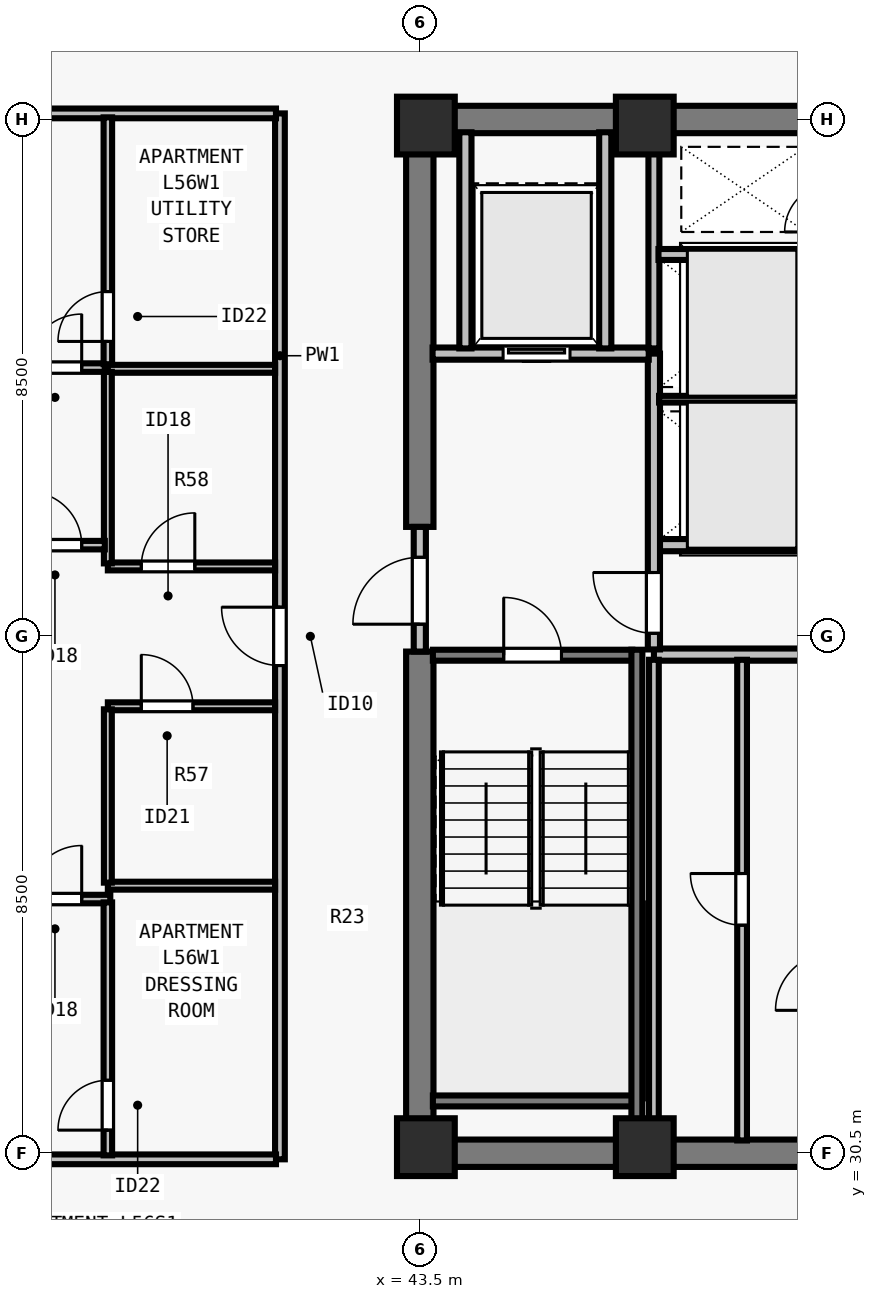
"""IFC4 building model, lengths in metres.
Left out: names, types, materials, properties, quantities, classifications, styles, units other than length and angle.
Written with IfcOpenShell. Run it as: python <this file> out.ifc"""

import sys

from ifc_helpers import new_model, si_unit, direction, frame, frame_2d, origin, origin_2d, place, context, subcontext, project, spatial, rectangle, extrude, element, fill, save


model = new_model("IFC4")
c1 = context("Model", 3, precision=1e-05, world=origin(), true_north=direction((0.0, 1.0)))
c2 = subcontext(c1, "Body", "Model", "MODEL_VIEW")
j1 = project(units=[si_unit("LENGTHUNIT", "METRE"), si_unit("PLANEANGLEUNIT", "RADIAN")], contexts=[c1])
p1 = place(None, origin())
s1 = spatial("IfcSite", under=j1, at=p1, CompositionType="ELEMENT")
p2 = place(p1, origin())
s2 = spatial("IfcBuilding", under=s1, at=p2, CompositionType="ELEMENT")
p3 = place(p2, frame((0.0, 0.0, 206.0)))
s3 = spatial("IfcBuildingStorey", under=s2, at=p3, CompositionType="ELEMENT", Elevation=206.0)
for number, where, z_axis, x_axis in (
    (1, (43.6, 30.6, 0.0), (0.0, 0.0, 1.0), (1.0, 0.0, 0.0)),
    (2, (47.2, 30.6, 0.0), (0.0, 0.0, 1.0), (1.0, 0.0, 0.0)),
    (3, (43.6, 47.4, 0.0), (0.0, 0.0, 1.0), (1.0, 0.0, 0.0)),
    (4, (47.2, 47.4, 0.0), (0.0, 0.0, 1.0), (1.0, 0.0, 0.0)),
):
    element("IfcColumn", number, at=place(p3, frame(where, z_axis=z_axis, x_axis=x_axis)), inside=s3, PredefinedType="COLUMN", context=c2, shape_type="SweptSolid", body=[
        extrude(rectangle(XDim=0.95, YDim=0.95, at=origin_2d()), origin(), (0.0, 0.0, 1.0), 3.5),
    ])
for number, where, z_axis, x_axis in (
    (5, (43.275, 30.5, 0.0), (0.0, 0.0, 1.0), (1.0, 0.0, 0.0)),
    (6, (43.275, 47.5, 0.0), (0.0, 0.0, 1.0), (1.0, 0.0, 0.0)),
):
    element("IfcWall", number, at=place(p3, frame(where, z_axis=z_axis, x_axis=x_axis)), inside=s3, PredefinedType="SHEAR", context=c2, shape_type="SweptSolid", body=[
        extrude(rectangle(XDim=17.45, YDim=0.45, at=frame_2d((8.725, 0.0))), origin(), (0.0, 0.0, 1.0), 3.29),
    ])
p4 = place(p3, frame((43.5, 30.715, 0.0), z_axis=(0.0, 0.0, 1.0), x_axis=(0.0, 1.0, 0.0)))
e7 = element("IfcWall", 7, at=p4, inside=s3, PredefinedType="SHEAR", context=c2, shape_type="SweptSolid", body=[
    extrude(rectangle(XDim=8.035, YDim=0.45, at=frame_2d((4.018, 0.0))), origin(), (0.0, 0.0, 1.0), 3.29),
])
p5 = place(p3, frame((43.5, 40.8, 0.0), z_axis=(0.0, 0.0, 1.0), x_axis=(0.0, 1.0, 0.0)))
e8 = element("IfcWall", 8, at=p5, inside=s3, PredefinedType="SHEAR", context=c2, shape_type="SweptSolid", body=[
    extrude(rectangle(XDim=6.485, YDim=0.45, at=frame_2d((3.242, 0.0))), origin(), (0.0, 0.0, 1.0), 3.29),
])
for number, where, z_axis, x_axis in (
    (9, (47.35, 38.7, 0.0), (0.0, 0.0, 1.0), (1.0, 0.0, 0.0)),
    (10, (47.35, 40.5, 0.0), (0.0, 0.0, 1.0), (1.0, 0.0, 0.0)),
):
    element("IfcWall", number, at=place(p3, frame(where, z_axis=z_axis, x_axis=x_axis)), inside=s3, PredefinedType="SOLIDWALL", context=c2, shape_type="SweptSolid", body=[
        extrude(rectangle(XDim=2.95, YDim=0.2, at=frame_2d((1.475, 0.0))), origin(), (0.0, 0.0, 1.0), 3.29),
    ])
p6 = place(p3, frame((43.5, 38.75, 0.0), z_axis=(0.0, 0.0, 1.0), x_axis=(0.0, 1.0, 0.0)))
e11 = element("IfcWall", 11, at=p6, inside=s3, PredefinedType="SOLIDWALL", context=c2, shape_type="SweptSolid", body=[
    extrude(rectangle(XDim=2.05, YDim=0.2, at=frame_2d((1.025, 0.0))), origin(), (0.0, 0.0, 1.0), 3.29),
])
p7 = place(p6, frame((0.45, 0.0, 0.0)))
e12 = element("IfcOpeningElement", 12, at=p7, cuts=e11, PredefinedType="OPENING", context=c2, shape_type="SweptSolid", body=[
    extrude(rectangle(XDim=1.1, YDim=2.15, at=frame_2d((0.55, 1.075))), frame((0.0, 0.11, 0.0), z_axis=(0.0, -1.0, 0.0), x_axis=(1.0, 0.0, 0.0)), (0.0, 0.0, 1.0), 0.22),
])
p8 = place(p3, frame((47.35, 38.785, 0.0), z_axis=(0.0, 0.0, 1.0), x_axis=(0.0, 1.0, 0.0)))
e13 = element("IfcWall", 13, at=p8, inside=s3, PredefinedType="SOLIDWALL", context=c2, shape_type="SweptSolid", body=[
    extrude(rectangle(XDim=4.865, YDim=0.2, at=frame_2d((2.433, 0.0))), origin(), (0.0, 0.0, 1.0), 3.29),
])
p9 = place(p8, frame((0.265, 0.0, 0.0)))
e14 = element("IfcOpeningElement", 14, at=p9, cuts=e13, PredefinedType="OPENING", context=c2, shape_type="SweptSolid", body=[
    extrude(rectangle(XDim=1.0, YDim=2.15, at=frame_2d((0.5, 1.075))), frame((0.0, 0.11, 0.0), z_axis=(0.0, -1.0, 0.0), x_axis=(1.0, 0.0, 0.0)), (0.0, 0.0, 1.0), 0.22),
])
p10 = place(p3, frame((43.71, 43.65, 0.0), z_axis=(0.0, 0.0, 1.0), x_axis=(1.0, 0.0, 0.0)))
e15 = element("IfcWall", 15, at=p10, inside=s3, PredefinedType="SOLIDWALL", context=c2, shape_type="SweptSolid", body=[
    extrude(rectangle(XDim=3.555, YDim=0.2, at=frame_2d((1.777, 0.0))), origin(), (0.0, 0.0, 1.0), 3.29),
])
p11 = place(p10, frame((1.16, 0.0, 0.0)))
e16 = element("IfcOpeningElement", 16, at=p11, cuts=e15, PredefinedType="OPENING", context=c2, shape_type="SweptSolid", body=[
    extrude(rectangle(XDim=1.1, YDim=2.2, at=frame_2d((0.55, 1.1))), frame((0.0, 0.11, 0.0), z_axis=(0.0, -1.0, 0.0), x_axis=(1.0, 0.0, 0.0)), (0.0, 0.0, 1.0), 0.22),
])
for number, where, z_axis, x_axis in (
    (17, (46.55, 43.735, 0.0), (0.0, 0.0, 1.0), (0.0, 1.0, 0.0)),
    (18, (44.25, 43.735, 0.0), (0.0, 0.0, 1.0), (0.0, 1.0, 0.0)),
):
    element("IfcWall", number, at=place(p3, frame(where, z_axis=z_axis, x_axis=x_axis)), inside=s3, PredefinedType="SOLIDWALL", context=c2, shape_type="SweptSolid", body=[
        extrude(rectangle(XDim=3.555, YDim=0.2, at=frame_2d((1.777, 0.0))), origin(), (0.0, 0.0, 1.0), 3.29),
    ])
p12 = place(p3, frame((47.35, 30.71, 0.0), z_axis=(0.0, 0.0, 1.0), x_axis=(0.0, 1.0, 0.0)))
e19 = element("IfcWall", 19, at=p12, inside=s3, PredefinedType="PARTITIONING", context=c2, shape_type="SweptSolid", body=[
    extrude(rectangle(XDim=7.905, YDim=0.16, at=frame_2d((3.953, 0.0))), origin(), (0.0, 0.0, 1.0), 3.29),
])
p13 = place(p3, frame((48.8, 30.71, 0.0), z_axis=(0.0, 0.0, 1.0), x_axis=(0.0, 1.0, 0.0)))
e20 = element("IfcWall", 20, at=p13, inside=s3, PredefinedType="PARTITIONING", context=c2, shape_type="SweptSolid", body=[
    extrude(rectangle(XDim=7.905, YDim=0.16, at=frame_2d((3.953, 0.0))), origin(), (0.0, 0.0, 1.0), 3.29),
])
p14 = place(p13, frame((3.54, 0.0, 0.0)))
e21 = element("IfcOpeningElement", 21, at=p14, cuts=e20, PredefinedType="OPENING", context=c2, shape_type="SweptSolid", body=[
    extrude(rectangle(XDim=0.85, YDim=2.12, at=frame_2d((0.425, 1.06))), frame((0.0, 0.09, 0.0), z_axis=(0.0, -1.0, 0.0), x_axis=(1.0, 0.0, 0.0)), (0.0, 0.0, 1.0), 0.18),
])
p15 = place(p3, frame((47.35, 43.735, 0.0), z_axis=(0.0, 0.0, 1.0), x_axis=(0.0, 1.0, 0.0)))
e22 = element("IfcWall", 22, at=p15, inside=s3, PredefinedType="SOLIDWALL", context=c2, shape_type="SweptSolid", body=[
    extrude(rectangle(XDim=3.555, YDim=0.18, at=frame_2d((1.777, 0.0))), origin(), (0.0, 0.0, 1.0), 3.29),
])
p16 = place(p3, frame((47.435, 42.9, 0.0), z_axis=(0.0, 0.0, 1.0), x_axis=(1.0, 0.0, 0.0)))
e23 = element("IfcWall", 23, at=p16, inside=s3, PredefinedType="PARTITIONING", context=c2, shape_type="SweptSolid", body=[
    extrude(rectangle(XDim=2.78, YDim=0.11, at=frame_2d((1.39, 0.0))), origin(), (0.0, 0.0, 1.0), 3.29),
])
p17 = place(p3, frame((47.425, 45.28, 0.0), z_axis=(0.0, 0.0, 1.0), x_axis=(1.0, 0.0, 0.0)))
e24 = element("IfcWall", 24, at=p17, inside=s3, PredefinedType="SOLIDWALL", context=c2, shape_type="SweptSolid", body=[
    extrude(rectangle(XDim=2.79, YDim=0.18, at=frame_2d((1.395, 0.0))), origin(), (0.0, 0.0, 1.0), 3.29),
])
p18 = place(p3, frame((41.2, 30.4, 0.0), z_axis=(0.0, 0.0, 1.0), x_axis=(0.0, 1.0, 0.0)))
e25 = element("IfcWall", 25, at=p18, inside=s3, PredefinedType="PARTITIONING", context=c2, shape_type="SweptSolid", body=[
    extrude(rectangle(XDim=17.2, YDim=0.16, at=frame_2d((8.6, 0.0))), origin(), (0.0, 0.0, 1.0), 3.29),
])
p19 = place(p18, frame((8.12, 0.0, 0.0)))
e26 = element("IfcOpeningElement", 26, at=p19, cuts=e25, PredefinedType="OPENING", context=c2, shape_type="SweptSolid", body=[
    extrude(rectangle(XDim=0.96, YDim=2.18, at=frame_2d((0.48, 1.09))), frame((0.0, 0.09, 0.0), z_axis=(0.0, -1.0, 0.0), x_axis=(1.0, 0.0, 0.0)), (0.0, 0.0, 1.0), 0.18),
])
for number, where, z_axis, x_axis in (
    (27, (29.805, 30.4, 0.0), (0.0, 0.0, 1.0), (1.0, 0.0, 0.0)),
    (28, (29.805, 47.6, 0.0), (0.0, 0.0, 1.0), (1.0, 0.0, 0.0)),
):
    element("IfcWall", number, at=place(p3, frame(where, z_axis=z_axis, x_axis=x_axis)), inside=s3, PredefinedType="PARTITIONING", context=c2, shape_type="SweptSolid", body=[
        extrude(rectangle(XDim=11.33, YDim=0.16, at=frame_2d((5.665, 0.0))), origin(), (0.0, 0.0, 1.0), 3.29),
    ])
p20 = place(p3, frame((38.37, 34.9, 0.0), z_axis=(0.0, 0.0, 1.0), x_axis=(1.0, 0.0, 0.0)))
e29 = element("IfcWall", 29, at=p20, inside=s3, PredefinedType="PLUMBINGWALL", context=c2, shape_type="SweptSolid", body=[
    extrude(rectangle(XDim=2.75, YDim=0.13, at=frame_2d((1.375, 0.0))), origin(), (0.0, 0.0, 1.0), 3.29),
])
p21 = place(p3, frame((38.37, 37.85, 0.0), z_axis=(0.0, 0.0, 1.0), x_axis=(1.0, 0.0, 0.0)))
e30 = element("IfcWall", 30, at=p21, inside=s3, PredefinedType="PLUMBINGWALL", context=c2, shape_type="SweptSolid", body=[
    extrude(rectangle(XDim=2.75, YDim=0.13, at=frame_2d((1.375, 0.0))), origin(), (0.0, 0.0, 1.0), 3.29),
])
p22 = place(p21, frame((0.55, 0.0, 0.0)))
e31 = element("IfcOpeningElement", 31, at=p22, cuts=e30, PredefinedType="OPENING", context=c2, shape_type="SweptSolid", body=[
    extrude(rectangle(XDim=0.85, YDim=2.08, at=frame_2d((0.425, 1.04))), frame((0.0, 0.075, 0.0), z_axis=(0.0, -1.0, 0.0), x_axis=(1.0, 0.0, 0.0)), (0.0, 0.0, 1.0), 0.15),
])
p23 = place(p3, frame((38.37, 34.95, 0.0), z_axis=(0.0, 0.0, 1.0), x_axis=(0.0, 1.0, 0.0)))
e32 = element("IfcWall", 32, at=p23, inside=s3, PredefinedType="PLUMBINGWALL", context=c2, shape_type="SweptSolid", body=[
    extrude(rectangle(XDim=2.85, YDim=0.13, at=frame_2d((1.425, 0.0))), origin(), (0.0, 0.0, 1.0), 3.29),
])
p24 = place(p3, frame((38.37, 43.4, 0.0), z_axis=(0.0, 0.0, 1.0), x_axis=(1.0, 0.0, 0.0)))
e33 = element("IfcWall", 33, at=p24, inside=s3, PredefinedType="PLUMBINGWALL", context=c2, shape_type="SweptSolid", body=[
    extrude(rectangle(XDim=2.75, YDim=0.13, at=frame_2d((1.375, 0.0))), origin(), (0.0, 0.0, 1.0), 2.958),
])
p25 = place(p3, frame((38.37, 40.15, 0.0), z_axis=(0.0, 0.0, 1.0), x_axis=(1.0, 0.0, 0.0)))
e34 = element("IfcWall", 34, at=p25, inside=s3, PredefinedType="PLUMBINGWALL", context=c2, shape_type="SweptSolid", body=[
    extrude(rectangle(XDim=2.75, YDim=0.13, at=frame_2d((1.375, 0.0))), origin(), (0.0, 0.0, 1.0), 3.29),
])
p26 = place(p25, frame((0.55, 0.0, 0.0)))
e35 = element("IfcOpeningElement", 35, at=p26, cuts=e34, PredefinedType="OPENING", context=c2, shape_type="SweptSolid", body=[
    extrude(rectangle(XDim=0.88, YDim=2.1, at=frame_2d((0.44, 1.05))), frame((0.0, 0.075, 0.0), z_axis=(0.0, -1.0, 0.0), x_axis=(1.0, 0.0, 0.0)), (0.0, 0.0, 1.0), 0.15),
])
p27 = place(p3, frame((38.37, 40.2, 0.0), z_axis=(0.0, 0.0, 1.0), x_axis=(0.0, 1.0, 0.0)))
e36 = element("IfcWall", 36, at=p27, inside=s3, PredefinedType="PLUMBINGWALL", context=c2, shape_type="SweptSolid", body=[
    extrude(rectangle(XDim=3.15, YDim=0.13, at=frame_2d((1.575, 0.0))), origin(), (0.0, 0.0, 1.0), 3.29),
])
p28 = place(p3, frame((29.88, 34.68, 0.0), z_axis=(0.0, 0.0, 1.0), x_axis=(1.0, 0.0, 0.0)))
e37 = element("IfcWall", 37, at=p28, inside=s3, PredefinedType="PARTITIONING", context=c2, shape_type="SweptSolid", body=[
    extrude(rectangle(XDim=8.53, YDim=0.14, at=frame_2d((4.265, 0.0))), origin(), (0.0, 0.0, 1.0), 2.958),
])
p29 = place(p28, frame((7.18, 0.0, 0.0)))
e38 = element("IfcOpeningElement", 38, at=p29, cuts=e37, PredefinedType="OPENING", context=c2, shape_type="SweptSolid", body=[
    extrude(rectangle(XDim=0.88, YDim=2.1, at=frame_2d((0.44, 1.05))), frame((0.0, 0.08, 0.0), z_axis=(0.0, -1.0, 0.0), x_axis=(1.0, 0.0, 0.0)), (0.0, 0.0, 1.0), 0.16),
])
p30 = place(p3, frame((38.37, 30.465, 0.0), z_axis=(0.0, 0.0, 1.0), x_axis=(0.0, 1.0, 0.0)))
e39 = element("IfcWall", 39, at=p30, inside=s3, PredefinedType="PARTITIONING", context=c2, shape_type="SweptSolid", body=[
    extrude(rectangle(XDim=4.16, YDim=0.14, at=frame_2d((2.08, 0.0))), origin(), (0.0, 0.0, 1.0), 3.29),
])
p31 = place(p30, frame((0.415, 0.0, 0.0)))
e40 = element("IfcOpeningElement", 40, at=p31, cuts=e39, PredefinedType="OPENING", context=c2, shape_type="SweptSolid", body=[
    extrude(rectangle(XDim=0.82, YDim=2.1, at=frame_2d((0.41, 1.05))), frame((0.0, 0.08, 0.0), z_axis=(0.0, -1.0, 0.0), x_axis=(1.0, 0.0, 0.0)), (0.0, 0.0, 1.0), 0.16),
])
p32 = place(p3, frame((29.88, 43.42, 0.0), z_axis=(0.0, 0.0, 1.0), x_axis=(1.0, 0.0, 0.0)))
e41 = element("IfcWall", 41, at=p32, inside=s3, PredefinedType="PARTITIONING", context=c2, shape_type="SweptSolid", body=[
    extrude(rectangle(XDim=8.44, YDim=0.14, at=frame_2d((4.22, 0.0))), origin(), (0.0, 0.0, 1.0), 3.29),
])
p33 = place(p32, frame((7.18, 0.0, 0.0)))
e42 = element("IfcOpeningElement", 42, at=p33, cuts=e41, PredefinedType="OPENING", context=c2, shape_type="SweptSolid", body=[
    extrude(rectangle(XDim=0.88, YDim=2.1, at=frame_2d((0.44, 1.05))), frame((0.0, 0.08, 0.0), z_axis=(0.0, -1.0, 0.0), x_axis=(1.0, 0.0, 0.0)), (0.0, 0.0, 1.0), 0.16),
])
p34 = place(p3, frame((38.37, 43.475, 0.0), z_axis=(0.0, 0.0, 1.0), x_axis=(0.0, 1.0, 0.0)))
e43 = element("IfcWall", 43, at=p34, inside=s3, PredefinedType="PARTITIONING", context=c2, shape_type="SweptSolid", body=[
    extrude(rectangle(XDim=4.06, YDim=0.14, at=frame_2d((2.03, 0.0))), origin(), (0.0, 0.0, 1.0), 3.29),
])
p35 = place(p34, frame((0.375, 0.0, 0.0)))
e44 = element("IfcOpeningElement", 44, at=p35, cuts=e43, PredefinedType="OPENING", context=c2, shape_type="SweptSolid", body=[
    extrude(rectangle(XDim=0.82, YDim=2.1, at=frame_2d((0.41, 1.05))), frame((0.0, 0.08, 0.0), z_axis=(0.0, -1.0, 0.0), x_axis=(1.0, 0.0, 0.0)), (0.0, 0.0, 1.0), 0.16),
])
p36 = place(p3, frame((29.88, 40.5, 0.0), z_axis=(0.0, 0.0, 1.0), x_axis=(1.0, 0.0, 0.0)))
e45 = element("IfcWall", 45, at=p36, inside=s3, PredefinedType="PARTITIONING", context=c2, shape_type="SweptSolid", body=[
    extrude(rectangle(XDim=8.44, YDim=0.14, at=frame_2d((4.22, 0.0))), origin(), (0.0, 0.0, 1.0), 2.958),
])
p37 = place(p36, frame((7.18, 0.0, 0.0)))
e46 = element("IfcOpeningElement", 46, at=p37, cuts=e45, PredefinedType="OPENING", context=c2, shape_type="SweptSolid", body=[
    extrude(rectangle(XDim=0.88, YDim=2.1, at=frame_2d((0.44, 1.05))), frame((0.0, 0.08, 0.0), z_axis=(0.0, -1.0, 0.0), x_axis=(1.0, 0.0, 0.0)), (0.0, 0.0, 1.0), 0.16),
])
p38 = place(p3, frame((43.715, 38.69, 0.0), z_axis=(0.0, 0.0, 1.0), x_axis=(1.0, 0.0, 0.0)))
e47 = element("IfcWall", 47, at=p38, inside=s3, PredefinedType="SOLIDWALL", context=c2, shape_type="SweptSolid", body=[
    extrude(rectangle(XDim=3.28, YDim=0.18, at=frame_2d((1.64, 0.0))), origin(), (0.0, 0.0, 1.0), 3.29),
])
p39 = place(p38, frame((1.165, 0.0, 0.0)))
e48 = element("IfcOpeningElement", 48, at=p39, cuts=e47, PredefinedType="OPENING", context=c2, shape_type="SweptSolid", body=[
    extrude(rectangle(XDim=0.95, YDim=2.15, at=frame_2d((0.475, 1.075))), frame((0.0, 0.1, 0.0), z_axis=(0.0, -1.0, 0.0), x_axis=(1.0, 0.0, 0.0)), (0.0, 0.0, 1.0), 0.2),
])
p40 = place(p3, frame((43.715, 31.36, 0.0), z_axis=(0.0, 0.0, 1.0), x_axis=(1.0, 0.0, 0.0)))
e49 = element("IfcWall", 49, at=p40, inside=s3, PredefinedType="SOLIDWALL", context=c2, shape_type="SweptSolid", body=[
    extrude(rectangle(XDim=3.28, YDim=0.18, at=frame_2d((1.64, 0.0))), origin(), (0.0, 0.0, 1.0), 3.29),
])
p41 = place(p3, frame((47.07, 38.78, 0.0), z_axis=(0.0, 0.0, 1.0), x_axis=(0.0, -1.0, 0.0)))
e50 = element("IfcWall", 50, at=p41, inside=s3, PredefinedType="SOLIDWALL", context=c2, shape_type="SweptSolid", body=[
    extrude(rectangle(XDim=8.067, YDim=0.18, at=frame_2d((4.034, 0.0))), origin(), (0.0, 0.0, 1.0), 3.29),
])
p42 = place(p7, origin())
e51 = element("IfcDoor", 51, at=p42, inside=s3, OperationType="SINGLE_SWING_LEFT", PredefinedType="DOOR", context=c2, shape_type="SweptSolid", body=[
    extrude(rectangle(XDim=1.1, YDim=2.15, at=frame_2d((0.55, 1.075))), frame((0.0, 0.025, 0.0), z_axis=(0.0, -1.0, 0.0), x_axis=(1.0, 0.0, 0.0)), (0.0, 0.0, 1.0), 0.05),
])
fill(e12, e51)
p43 = place(p9, origin())
e52 = element("IfcDoor", 52, at=p43, inside=s3, OperationType="SINGLE_SWING_RIGHT", PredefinedType="DOOR", context=c2, shape_type="SweptSolid", body=[
    extrude(rectangle(XDim=1.0, YDim=2.15, at=frame_2d((0.5, 1.075))), frame((0.0, 0.025, 0.0), z_axis=(0.0, -1.0, 0.0), x_axis=(1.0, 0.0, 0.0)), (0.0, 0.0, 1.0), 0.05),
])
fill(e14, e52)
p44 = place(p11, origin())
e53 = element("IfcDoor", 53, at=p44, inside=s3, OperationType="SLIDING_TO_LEFT", PredefinedType="DOOR", context=c2, shape_type="SweptSolid", body=[
    extrude(rectangle(XDim=1.1, YDim=2.2, at=frame_2d((0.55, 1.1))), frame((0.0, 0.025, 0.0), z_axis=(0.0, -1.0, 0.0), x_axis=(1.0, 0.0, 0.0)), (0.0, 0.0, 1.0), 0.05),
])
fill(e16, e53)
p45 = place(p14, origin())
e54 = element("IfcDoor", 54, at=p45, inside=s3, OperationType="SINGLE_SWING_RIGHT", PredefinedType="DOOR", context=c2, shape_type="SweptSolid", body=[
    extrude(rectangle(XDim=0.85, YDim=2.12, at=frame_2d((0.425, 1.06))), frame((0.0, 0.025, 0.0), z_axis=(0.0, -1.0, 0.0), x_axis=(1.0, 0.0, 0.0)), (0.0, 0.0, 1.0), 0.05),
])
fill(e21, e54)
p46 = place(p22, origin())
e55 = element("IfcDoor", 55, at=p46, inside=s3, OperationType="SINGLE_SWING_LEFT", PredefinedType="DOOR", context=c2, shape_type="SweptSolid", body=[
    extrude(rectangle(XDim=0.85, YDim=2.08, at=frame_2d((0.425, 1.04))), frame((0.0, 0.025, 0.0), z_axis=(0.0, -1.0, 0.0), x_axis=(1.0, 0.0, 0.0)), (0.0, 0.0, 1.0), 0.05),
])
fill(e31, e55)
p47 = place(p26, origin())
e56 = element("IfcDoor", 56, at=p47, inside=s3, OperationType="SINGLE_SWING_RIGHT", PredefinedType="DOOR", context=c2, shape_type="SweptSolid", body=[
    extrude(rectangle(XDim=0.88, YDim=2.1, at=frame_2d((0.44, 1.05))), frame((0.0, 0.025, 0.0), z_axis=(0.0, -1.0, 0.0), x_axis=(1.0, 0.0, 0.0)), (0.0, 0.0, 1.0), 0.05),
])
fill(e35, e56)
p48 = place(p31, origin())
e57 = element("IfcDoor", 57, at=p48, inside=s3, OperationType="SINGLE_SWING_LEFT", PredefinedType="DOOR", context=c2, shape_type="SweptSolid", body=[
    extrude(rectangle(XDim=0.82, YDim=2.1, at=frame_2d((0.41, 1.05))), frame((0.0, 0.025, 0.0), z_axis=(0.0, -1.0, 0.0), x_axis=(1.0, 0.0, 0.0)), (0.0, 0.0, 1.0), 0.05),
])
fill(e40, e57)
p49 = place(p29, origin())
e58 = element("IfcDoor", 58, at=p49, inside=s3, OperationType="SINGLE_SWING_RIGHT", PredefinedType="DOOR", context=c2, shape_type="SweptSolid", body=[
    extrude(rectangle(XDim=0.88, YDim=2.1, at=frame_2d((0.44, 1.05))), frame((0.0, 0.025, 0.0), z_axis=(0.0, -1.0, 0.0), x_axis=(1.0, 0.0, 0.0)), (0.0, 0.0, 1.0), 0.05),
])
fill(e38, e58)
p50 = place(p35, origin())
e59 = element("IfcDoor", 59, at=p50, inside=s3, OperationType="SINGLE_SWING_LEFT", PredefinedType="DOOR", context=c2, shape_type="SweptSolid", body=[
    extrude(rectangle(XDim=0.82, YDim=2.1, at=frame_2d((0.41, 1.05))), frame((0.0, 0.025, 0.0), z_axis=(0.0, -1.0, 0.0), x_axis=(1.0, 0.0, 0.0)), (0.0, 0.0, 1.0), 0.05),
])
fill(e44, e59)
p51 = place(p33, origin())
e60 = element("IfcDoor", 60, at=p51, inside=s3, OperationType="SINGLE_SWING_RIGHT", PredefinedType="DOOR", context=c2, shape_type="SweptSolid", body=[
    extrude(rectangle(XDim=0.88, YDim=2.1, at=frame_2d((0.44, 1.05))), frame((0.0, 0.025, 0.0), z_axis=(0.0, -1.0, 0.0), x_axis=(1.0, 0.0, 0.0)), (0.0, 0.0, 1.0), 0.05),
])
fill(e42, e60)
p52 = place(p37, origin())
e61 = element("IfcDoor", 61, at=p52, inside=s3, OperationType="SINGLE_SWING_LEFT", PredefinedType="DOOR", context=c2, shape_type="SweptSolid", body=[
    extrude(rectangle(XDim=0.88, YDim=2.1, at=frame_2d((0.44, 1.05))), frame((0.0, 0.025, 0.0), z_axis=(0.0, -1.0, 0.0), x_axis=(1.0, 0.0, 0.0)), (0.0, 0.0, 1.0), 0.05),
])
fill(e46, e61)
p53 = place(p19, origin())
e62 = element("IfcDoor", 62, at=p53, inside=s3, OperationType="SINGLE_SWING_RIGHT", PredefinedType="DOOR", context=c2, shape_type="SweptSolid", body=[
    extrude(rectangle(XDim=0.96, YDim=2.18, at=frame_2d((0.48, 1.09))), frame((0.0, 0.025, 0.0), z_axis=(0.0, -1.0, 0.0), x_axis=(1.0, 0.0, 0.0)), (0.0, 0.0, 1.0), 0.05),
])
fill(e26, e62)
p54 = place(p39, origin())
e63 = element("IfcDoor", 63, at=p54, inside=s3, OperationType="SINGLE_SWING_LEFT", PredefinedType="DOOR", context=c2, shape_type="SweptSolid", body=[
    extrude(rectangle(XDim=0.95, YDim=2.15, at=frame_2d((0.475, 1.075))), frame((0.0, 0.025, 0.0), z_axis=(0.0, -1.0, 0.0), x_axis=(1.0, 0.0, 0.0)), (0.0, 0.0, 1.0), 0.05),
])
fill(e48, e63)
save(model, sys.argv[1])
